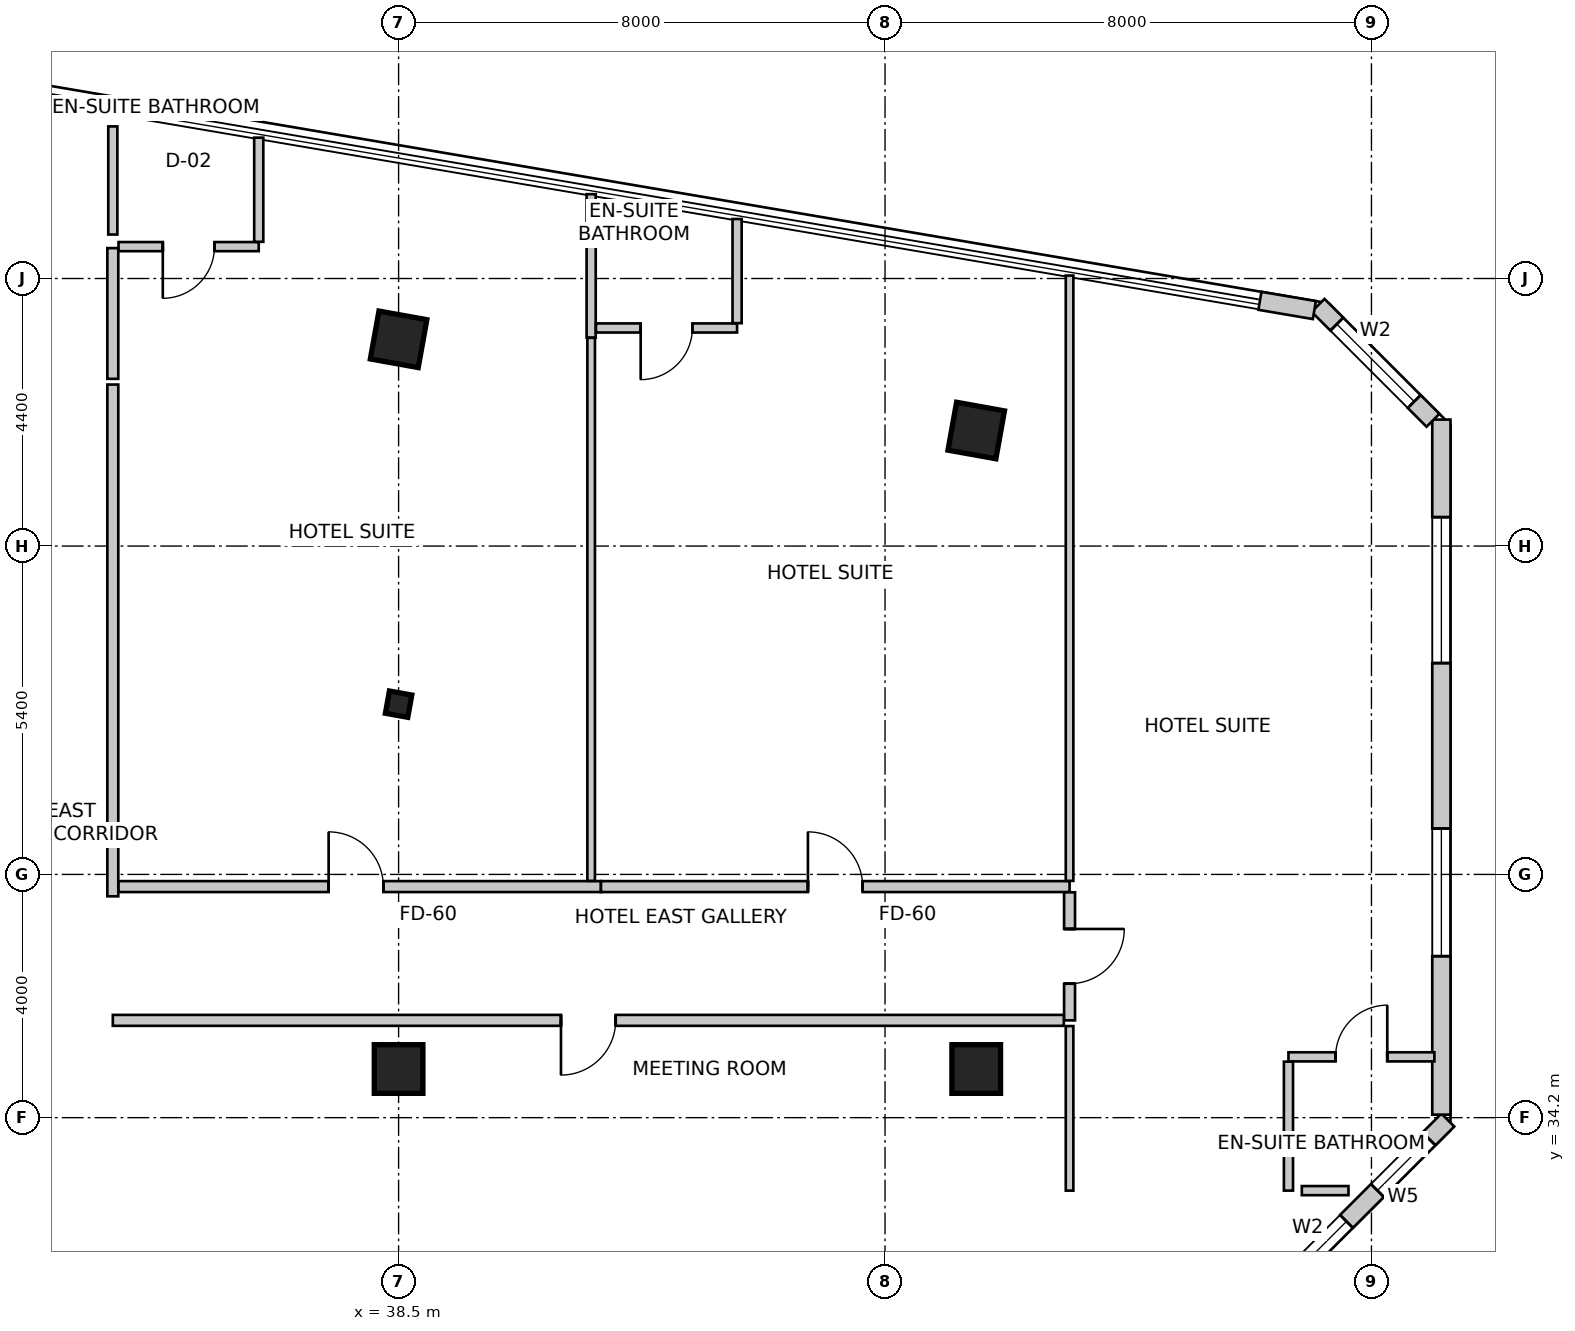
"""IFC4 building model, lengths in metres.
Left out: names, types, materials, properties, quantities, classifications, styles, units other than length and angle.
Written with IfcOpenShell. Run it as: python <this file> out.ifc"""

import sys

from ifc_helpers import new_model, si_unit, direction, frame, frame_2d, origin, origin_2d, place, context, subcontext, project, spatial, rectangle, i_section, extrude, source, transform, mapped, element, fill, save


model = new_model("IFC4")
c1 = context("Model", 3, precision=1e-05, world=origin(), true_north=direction((0.0, 1.0)))
c2 = subcontext(c1, "Body", "Model", "MODEL_VIEW")
j1 = project(units=[si_unit("LENGTHUNIT", "METRE"), si_unit("PLANEANGLEUNIT", "RADIAN")], contexts=[c1])
p1 = place(None, origin())
s1 = spatial("IfcSite", under=j1, at=p1, CompositionType="ELEMENT")
p2 = place(p1, origin())
s2 = spatial("IfcBuilding", under=s1, at=p2, CompositionType="ELEMENT")
p3 = place(p2, frame((0.0, 0.0, 143.0)))
s3 = spatial("IfcBuildingStorey", under=s2, at=p3, CompositionType="ELEMENT", Elevation=143.0)
m1 = source(origin(), c2, "Body", "SweptSolid", [
    extrude(rectangle(XDim=0.8, YDim=0.8, at=origin_2d()), origin(), (0.0, 0.0, 1.0), 3.6),
])
for number, where, z_axis, x_axis in (
    (1, (38.5, 47.0, 0.0), (0.0, 0.0, 1.0), (0.984, -0.177, 0.0)),
    (2, (48.0, 45.5, 0.0), (0.0, 0.0, 1.0), (0.984, -0.177, 0.0)),
    (3, (38.5, 35.0, 0.0), (0.0, 0.0, 1.0), (1.0, 0.0, 0.0)),
    (4, (48.0, 35.0, 0.0), (0.0, 0.0, 1.0), (1.0, 0.0, 0.0)),
):
    element("IfcColumn", number, at=place(p3, frame(where, z_axis=z_axis, x_axis=x_axis)), inside=s3, PredefinedType="COLUMN", context=c2, shape_type="MappedRepresentation", body=[
        mapped(m1, transform((0.0, 0.0, 0.0), scale=1.0)),
    ])
m2 = source(origin(), c2, "Body", "SweptSolid", [
    extrude(i_section(OverallWidth=0.374, OverallDepth=0.372, WebThickness=0.016, FlangeThickness=0.026, FilletRadius=0.015, at=origin_2d()), origin(), (0.0, 0.0, 1.0), 3.6),
])
p4 = place(p3, frame((38.5, 41.0, 0.0), z_axis=(0.0, 0.0, 1.0), x_axis=(0.984195607969, -0.17708474032, 0.0)))
e5 = element("IfcColumn", 5, at=p4, inside=s3, PredefinedType="COLUMN", context=c2, shape_type="MappedRepresentation", body=[
    mapped(m2, transform((0.0, 0.0, 0.0), scale=1.0)),
])
p5 = place(p3, frame((52.476, 30.88, 0.0), z_axis=(0.0, 0.0, 1.0), x_axis=(0.707106781187, 0.707106781187, 0.0)))
e6 = element("IfcWall", 6, at=p5, inside=s3, PredefinedType="SOLIDWALL", context=c2, shape_type="SweptSolid", body=[
    extrude(rectangle(XDim=4.639, YDim=0.3, at=frame_2d((2.319, 0.0))), origin(), (0.0, 0.0, 1.0), 3.35),
])
m3 = source(origin(), c2, "Body", "SweptSolid", [
    extrude(rectangle(XDim=1.8, YDim=2.1, at=frame_2d((0.9, 1.05))), frame((0.0, 0.16, 0.0), z_axis=(0.0, -1.0, 0.0), x_axis=(1.0, 0.0, 0.0)), (0.0, 0.0, 1.0), 0.32),
])
p6 = place(p5, frame((0.482, 0.0, 0.85)))
e7 = element("IfcOpeningElement", 7, at=p6, cuts=e6, PredefinedType="OPENING", context=c2, shape_type="MappedRepresentation", body=[
    mapped(m3, transform((0.0, 0.0, 0.0), scale=1.0)),
])
m4 = source(origin(), c2, "Body", "SweptSolid", [
    extrude(rectangle(XDim=1.2, YDim=1.6, at=frame_2d((0.6, 0.8))), frame((0.0, 0.16, 0.0), z_axis=(0.0, -1.0, 0.0), x_axis=(1.0, 0.0, 0.0)), (0.0, 0.0, 1.0), 0.32),
])
p7 = place(p5, frame((3.001, 0.0, 0.85)))
e8 = element("IfcOpeningElement", 8, at=p7, cuts=e6, PredefinedType="OPENING", context=c2, shape_type="MappedRepresentation", body=[
    mapped(m4, transform((0.0, 0.0, 0.0), scale=1.0)),
])
p8 = place(p3, frame((55.65, 34.249, 0.0), z_axis=(0.0, 0.0, 1.0), x_axis=(0.0, 1.0, 0.0)))
e9 = element("IfcWall", 9, at=p8, inside=s3, PredefinedType="SOLIDWALL", context=c2, shape_type="SweptSolid", body=[
    extrude(rectangle(XDim=11.431, YDim=0.3, at=frame_2d((5.715, 0.0))), origin(), (0.0, 0.0, 1.0), 3.35),
])
m5 = source(origin(), c2, "Body", "SweptSolid", [
    extrude(rectangle(XDim=2.1, YDim=2.0, at=frame_2d((1.05, 1.0))), frame((0.0, 0.16, 0.0), z_axis=(0.0, -1.0, 0.0), x_axis=(1.0, 0.0, 0.0)), (0.0, 0.0, 1.0), 0.32),
])
p9 = place(p8, frame((2.606, 0.0, 0.85)))
e10 = element("IfcOpeningElement", 10, at=p9, cuts=e9, PredefinedType="OPENING", context=c2, shape_type="MappedRepresentation", body=[
    mapped(m5, transform((0.0, 0.0, 0.0), scale=1.0)),
])
m6 = source(origin(), c2, "Body", "SweptSolid", [
    extrude(rectangle(XDim=2.4, YDim=2.2, at=frame_2d((1.2, 1.1))), frame((0.0, 0.16, 0.0), z_axis=(0.0, -1.0, 0.0), x_axis=(1.0, 0.0, 0.0)), (0.0, 0.0, 1.0), 0.32),
])
p10 = place(p8, frame((7.426, 0.0, 0.85)))
e11 = element("IfcOpeningElement", 11, at=p10, cuts=e9, PredefinedType="OPENING", context=c2, shape_type="MappedRepresentation", body=[
    mapped(m6, transform((0.0, 0.0, 0.0), scale=1.0)),
])
p11 = place(p3, frame((55.512, 45.668, 0.0), z_axis=(0.0, 0.0, 1.0), x_axis=(-0.707152443695, 0.707061115729, 0.0)))
e12 = element("IfcWall", 12, at=p11, inside=s3, PredefinedType="SOLIDWALL", context=c2, shape_type="SweptSolid", body=[
    extrude(rectangle(XDim=2.673, YDim=0.3, at=frame_2d((1.337, 0.0))), origin(), (0.0, 0.0, 1.0), 3.35),
])
p12 = place(p11, frame((0.437, 0.0, 0.85)))
e13 = element("IfcOpeningElement", 13, at=p12, cuts=e12, PredefinedType="OPENING", context=c2, shape_type="MappedRepresentation", body=[
    mapped(m3, transform((0.0, 0.0, 0.0), scale=1.0)),
])
p13 = place(p3, frame((53.561, 47.48, 0.0), z_axis=(0.0, 0.0, 1.0), x_axis=(-0.985836300899, 0.167710428506, 0.0)))
e14 = element("IfcWall", 14, at=p13, inside=s3, PredefinedType="SOLIDWALL", context=c2, shape_type="SweptSolid", body=[
    extrude(rectangle(XDim=0.908, YDim=0.3, at=frame_2d((0.454, 0.0))), origin(), (0.0, 0.0, 1.0), 3.35),
])
p14 = place(p3, frame((33.8, 48.5, 0.0), z_axis=(0.0, 0.0, 1.0), x_axis=(0.0, -1.0, 0.0)))
e15 = element("IfcWall", 15, at=p14, inside=s3, PredefinedType="PARTITIONING", context=c2, shape_type="SweptSolid", body=[
    extrude(rectangle(XDim=2.15, YDim=0.18, at=frame_2d((1.075, 0.0))), origin(), (0.0, 0.0, 1.0), 2.492),
])
p15 = place(p3, frame((33.8, 46.256, 0.0), z_axis=(0.0, 0.0, 1.0), x_axis=(0.0, -1.0, 0.0)))
e16 = element("IfcWall", 16, at=p15, inside=s3, PredefinedType="PARTITIONING", context=c2, shape_type="SweptSolid", body=[
    extrude(rectangle(XDim=8.416, YDim=0.18, at=frame_2d((4.208, 0.0))), origin(), (0.0, 0.0, 1.0), 2.922),
])
p16 = place(p3, frame((33.894, 38.0, 0.0), z_axis=(0.0, 0.0, 1.0), x_axis=(1.0, 0.0, 0.0)))
e17 = element("IfcWall", 17, at=p16, inside=s3, PredefinedType="PARTITIONING", context=c2, shape_type="SweptSolid", body=[
    extrude(rectangle(XDim=7.933, YDim=0.18, at=frame_2d((3.966, 0.0))), origin(), (0.0, 0.0, 1.0), 2.803),
])
m7 = source(origin(), c2, "Body", "SweptSolid", [
    extrude(rectangle(XDim=0.9, YDim=2.15, at=frame_2d((0.45, 1.075))), frame((0.0, 0.1, 0.0), z_axis=(0.0, -1.0, 0.0), x_axis=(1.0, 0.0, 0.0)), (0.0, 0.0, 1.0), 0.2),
])
p17 = place(p16, frame((3.455, 0.0, 0.0)))
e18 = element("IfcOpeningElement", 18, at=p17, cuts=e17, PredefinedType="OPENING", context=c2, shape_type="MappedRepresentation", body=[
    mapped(m7, transform((0.0, 0.0, 0.0), scale=1.0)),
])
p18 = place(p3, frame((41.829, 38.0, 0.0), z_axis=(0.0, 0.0, 1.0), x_axis=(1.0, 0.0, 0.0)))
e19 = element("IfcWall", 19, at=p18, inside=s3, PredefinedType="PARTITIONING", context=c2, shape_type="SweptSolid", body=[
    extrude(rectangle(XDim=7.706, YDim=0.18, at=frame_2d((3.853, 0.0))), origin(), (0.0, 0.0, 1.0), 2.803),
])
p19 = place(p18, frame((3.403, 0.0, 0.0)))
e20 = element("IfcOpeningElement", 20, at=p19, cuts=e19, PredefinedType="OPENING", context=c2, shape_type="MappedRepresentation", body=[
    mapped(m7, transform((0.0, 0.0, 0.0), scale=1.0)),
])
p20 = place(p3, frame((49.535, 37.906, 0.0), z_axis=(0.0, 0.0, 1.0), x_axis=(0.0, -1.0, 0.0)))
e21 = element("IfcWall", 21, at=p20, inside=s3, PredefinedType="PARTITIONING", context=c2, shape_type="SweptSolid", body=[
    extrude(rectangle(XDim=2.106, YDim=0.18, at=frame_2d((1.053, 0.0))), origin(), (0.0, 0.0, 1.0), 3.35),
])
p21 = place(p20, frame((0.603, 0.0, 0.0)))
e22 = element("IfcOpeningElement", 22, at=p21, cuts=e21, PredefinedType="OPENING", context=c2, shape_type="MappedRepresentation", body=[
    mapped(m7, transform((0.0, 0.0, 0.0), scale=1.0)),
])
p22 = place(p3, frame((49.441, 35.8, 0.0), z_axis=(0.0, 0.0, 1.0), x_axis=(-1.0, 0.0, 0.0)))
e23 = element("IfcWall", 23, at=p22, inside=s3, PredefinedType="PARTITIONING", context=c2, shape_type="SweptSolid", body=[
    extrude(rectangle(XDim=15.641, YDim=0.18, at=frame_2d((7.82, 0.0))), origin(), (0.0, 0.0, 1.0), 2.803),
])
p23 = place(p22, frame((7.371, 0.0, 0.0)))
e24 = element("IfcOpeningElement", 24, at=p23, cuts=e23, PredefinedType="OPENING", context=c2, shape_type="MappedRepresentation", body=[
    mapped(m7, transform((0.0, 0.0, 0.0), scale=1.0)),
])
p24 = place(p3, frame((36.2, 48.524, 0.0), z_axis=(0.0, 0.0, 1.0), x_axis=(-1.0, 0.0, 0.0)))
e25 = element("IfcWall", 25, at=p24, inside=s3, PredefinedType="PARTITIONING", context=c2, shape_type="SweptSolid", body=[
    extrude(rectangle(XDim=2.306, YDim=0.15, at=frame_2d((1.153, 0.0))), origin(), (0.0, 0.0, 1.0), 3.35),
])
m8 = source(origin(), c2, "Body", "SweptSolid", [
    extrude(rectangle(XDim=0.85, YDim=2.15, at=frame_2d((0.425, 1.075))), frame((0.0, 0.085, 0.0), z_axis=(0.0, -1.0, 0.0), x_axis=(1.0, 0.0, 0.0)), (0.0, 0.0, 1.0), 0.17),
])
p25 = place(p24, frame((0.728, 0.0, 0.0)))
e26 = element("IfcOpeningElement", 26, at=p25, cuts=e25, PredefinedType="OPENING", context=c2, shape_type="MappedRepresentation", body=[
    mapped(m8, transform((0.0, 0.0, 0.0), scale=1.0)),
])
p26 = place(p3, frame((36.2, 50.316, 0.0), z_axis=(0.0, 0.0, 1.0), x_axis=(0.0, -1.0, 0.0)))
e27 = element("IfcWall", 27, at=p26, inside=s3, PredefinedType="PARTITIONING", context=c2, shape_type="SweptSolid", body=[
    extrude(rectangle(XDim=1.713, YDim=0.15, at=frame_2d((0.856, 0.0))), origin(), (0.0, 0.0, 1.0), 3.35),
])
p27 = place(p3, frame((41.667, 49.387, 0.0), z_axis=(0.0, 0.0, 1.0), x_axis=(0.0, -1.0, 0.0)))
e28 = element("IfcWall", 28, at=p27, inside=s3, PredefinedType="PARTITIONING", context=c2, shape_type="SweptSolid", body=[
    extrude(rectangle(XDim=2.36, YDim=0.15, at=frame_2d((1.18, 0.0))), origin(), (0.0, 0.0, 1.0), 3.35),
])
p28 = place(p3, frame((41.667, 47.025, 0.0), z_axis=(0.0, 0.0, 1.0), x_axis=(0.0, -1.0, 0.0)))
e29 = element("IfcWall", 29, at=p28, inside=s3, PredefinedType="PARTITIONING", context=c2, shape_type="SweptSolid", body=[
    extrude(rectangle(XDim=8.931, YDim=0.125, at=frame_2d((4.465, 0.0))), origin(), (0.0, 0.0, 1.0), 2.492),
])
p29 = place(p3, frame((44.067, 47.187, 0.0), z_axis=(0.0, 0.0, 1.0), x_axis=(-1.0, 0.0, 0.0)))
e30 = element("IfcWall", 30, at=p29, inside=s3, PredefinedType="PARTITIONING", context=c2, shape_type="SweptSolid", body=[
    extrude(rectangle(XDim=2.321, YDim=0.15, at=frame_2d((1.16, 0.0))), origin(), (0.0, 0.0, 1.0), 3.35),
])
p30 = place(p29, frame((0.736, 0.0, 0.0)))
e31 = element("IfcOpeningElement", 31, at=p30, cuts=e30, PredefinedType="OPENING", context=c2, shape_type="MappedRepresentation", body=[
    mapped(m8, transform((0.0, 0.0, 0.0), scale=1.0)),
])
p31 = place(p3, frame((44.067, 48.979, 0.0), z_axis=(0.0, 0.0, 1.0), x_axis=(0.0, -1.0, 0.0)))
e32 = element("IfcWall", 32, at=p31, inside=s3, PredefinedType="PARTITIONING", context=c2, shape_type="SweptSolid", body=[
    extrude(rectangle(XDim=1.713, YDim=0.15, at=frame_2d((0.856, 0.0))), origin(), (0.0, 0.0, 1.0), 3.35),
])
p32 = place(p3, frame((49.535, 48.049, 0.0), z_axis=(0.0, 0.0, 1.0), x_axis=(0.0, -1.0, 0.0)))
e33 = element("IfcWall", 33, at=p32, inside=s3, PredefinedType="PARTITIONING", context=c2, shape_type="SweptSolid", body=[
    extrude(rectangle(XDim=9.955, YDim=0.125, at=frame_2d((4.977, 0.0))), origin(), (0.0, 0.0, 1.0), 3.35),
])
p33 = place(p3, frame((53.135, 35.2, 0.0), z_axis=(0.0, 0.0, 1.0), x_axis=(1.0, 0.0, 0.0)))
e34 = element("IfcWall", 34, at=p33, inside=s3, PredefinedType="PARTITIONING", context=c2, shape_type="SweptSolid", body=[
    extrude(rectangle(XDim=2.4, YDim=0.15, at=frame_2d((1.2, 0.0))), origin(), (0.0, 0.0, 1.0), 3.35),
])
p34 = place(p33, frame((0.775, 0.0, 0.0)))
e35 = element("IfcOpeningElement", 35, at=p34, cuts=e34, PredefinedType="OPENING", context=c2, shape_type="MappedRepresentation", body=[
    mapped(m8, transform((0.0, 0.0, 0.0), scale=1.0)),
])
p35 = place(p3, frame((53.135, 33.0, 0.0), z_axis=(0.0, 0.0, 1.0), x_axis=(0.0, 1.0, 0.0)))
e36 = element("IfcWall", 36, at=p35, inside=s3, PredefinedType="PARTITIONING", context=c2, shape_type="SweptSolid", body=[
    extrude(rectangle(XDim=2.121, YDim=0.15, at=frame_2d((1.061, 0.0))), origin(), (0.0, 0.0, 1.0), 3.35),
])
p36 = place(p3, frame((49.535, 33.0, 0.0), z_axis=(0.0, 0.0, 1.0), x_axis=(0.0, 1.0, 0.0)))
e37 = element("IfcWall", 37, at=p36, inside=s3, PredefinedType="PARTITIONING", context=c2, shape_type="SweptSolid", body=[
    extrude(rectangle(XDim=2.706, YDim=0.125, at=frame_2d((1.353, 0.0))), origin(), (0.0, 0.0, 1.0), 3.35),
])
p37 = place(p3, frame((33.8, 48.723, 0.0), z_axis=(0.0, 0.0, 1.0), x_axis=(0.0, 1.0, 0.0)))
e38 = element("IfcWall", 38, at=p37, inside=s3, PredefinedType="PARTITIONING", context=c2, shape_type="SweptSolid", body=[
    extrude(rectangle(XDim=1.778, YDim=0.15, at=frame_2d((0.889, 0.0))), origin(), (0.0, 0.0, 1.0), 3.35),
])
p38 = place(p3, frame((54.122, 33.0, 0.0), z_axis=(0.0, 0.0, 1.0), x_axis=(-1.0, 0.0, 0.0)))
e39 = element("IfcWall", 39, at=p38, inside=s3, PredefinedType="PARTITIONING", context=c2, shape_type="SweptSolid", body=[
    extrude(rectangle(XDim=0.767, YDim=0.15, at=frame_2d((0.384, 0.0))), origin(), (0.0, 0.0, 1.0), 3.35),
])
m9 = source(origin(), c2, "Body", "SweptSolid", [
    extrude(rectangle(XDim=1.8, YDim=2.1, at=frame_2d((0.9, 1.05))), frame((0.0, -0.015, 0.0), z_axis=(0.0, -1.0, 0.0), x_axis=(1.0, 0.0, 0.0)), (0.0, 0.0, 1.0), 0.06),
])
p39 = place(p6, origin())
e40 = element("IfcWindow", 40, at=p39, inside=s3, PartitioningType="SINGLE_PANEL", PredefinedType="WINDOW", context=c2, shape_type="MappedRepresentation", body=[
    mapped(m9, transform((0.0, 0.0, 0.0), scale=1.0)),
])
fill(e7, e40)
m10 = source(origin(), c2, "Body", "SweptSolid", [
    extrude(rectangle(XDim=1.2, YDim=1.6, at=frame_2d((0.6, 0.8))), frame((0.0, -0.015, 0.0), z_axis=(0.0, -1.0, 0.0), x_axis=(1.0, 0.0, 0.0)), (0.0, 0.0, 1.0), 0.06),
])
p40 = place(p7, origin())
e41 = element("IfcWindow", 41, at=p40, inside=s3, PartitioningType="SINGLE_PANEL", PredefinedType="WINDOW", context=c2, shape_type="MappedRepresentation", body=[
    mapped(m10, transform((0.0, 0.0, 0.0), scale=1.0)),
])
fill(e8, e41)
m11 = source(origin(), c2, "Body", "SweptSolid", [
    extrude(rectangle(XDim=2.1, YDim=2.0, at=frame_2d((1.05, 1.0))), frame((0.0, -0.015, 0.0), z_axis=(0.0, -1.0, 0.0), x_axis=(1.0, 0.0, 0.0)), (0.0, 0.0, 1.0), 0.06),
])
p41 = place(p9, origin())
e42 = element("IfcWindow", 42, at=p41, inside=s3, PartitioningType="SINGLE_PANEL", PredefinedType="WINDOW", context=c2, shape_type="MappedRepresentation", body=[
    mapped(m11, transform((0.0, 0.0, 0.0), scale=1.0)),
])
fill(e10, e42)
m12 = source(origin(), c2, "Body", "SweptSolid", [
    extrude(rectangle(XDim=2.4, YDim=2.2, at=frame_2d((1.2, 1.1))), frame((0.0, -0.015, 0.0), z_axis=(0.0, -1.0, 0.0), x_axis=(1.0, 0.0, 0.0)), (0.0, 0.0, 1.0), 0.06),
])
p42 = place(p10, origin())
e43 = element("IfcWindow", 43, at=p42, inside=s3, PartitioningType="SINGLE_PANEL", PredefinedType="WINDOW", context=c2, shape_type="MappedRepresentation", body=[
    mapped(m12, transform((0.0, 0.0, 0.0), scale=1.0)),
])
fill(e11, e43)
p43 = place(p12, origin())
e44 = element("IfcWindow", 44, at=p43, inside=s3, PartitioningType="SINGLE_PANEL", PredefinedType="WINDOW", context=c2, shape_type="MappedRepresentation", body=[
    mapped(m9, transform((0.0, 0.0, 0.0), scale=1.0)),
])
fill(e13, e44)
m13 = source(origin(), c2, "Body", "SweptSolid", [
    extrude(rectangle(XDim=0.85, YDim=2.15, at=frame_2d((0.425, 1.075))), frame((0.0, 0.025, 0.0), z_axis=(0.0, -1.0, 0.0), x_axis=(1.0, 0.0, 0.0)), (0.0, 0.0, 1.0), 0.05),
])
p44 = place(p25, origin())
e45 = element("IfcDoor", 45, at=p44, inside=s3, OperationType="SINGLE_SWING_RIGHT", PredefinedType="DOOR", context=c2, shape_type="MappedRepresentation", body=[
    mapped(m13, transform((0.0, 0.0, 0.0), scale=1.0)),
])
fill(e26, e45)
m14 = source(origin(), c2, "Body", "SweptSolid", [
    extrude(rectangle(XDim=0.9, YDim=2.15, at=frame_2d((0.45, 1.075))), frame((0.0, 0.025, 0.0), z_axis=(0.0, -1.0, 0.0), x_axis=(1.0, 0.0, 0.0)), (0.0, 0.0, 1.0), 0.05),
])
p45 = place(p17, origin())
e46 = element("IfcDoor", 46, at=p45, inside=s3, OperationType="SINGLE_SWING_LEFT", PredefinedType="DOOR", context=c2, shape_type="MappedRepresentation", body=[
    mapped(m14, transform((0.0, 0.0, 0.0), scale=1.0)),
])
fill(e18, e46)
p46 = place(p30, origin())
e47 = element("IfcDoor", 47, at=p46, inside=s3, OperationType="SINGLE_SWING_RIGHT", PredefinedType="DOOR", context=c2, shape_type="MappedRepresentation", body=[
    mapped(m13, transform((0.0, 0.0, 0.0), scale=1.0)),
])
fill(e31, e47)
p47 = place(p19, origin())
e48 = element("IfcDoor", 48, at=p47, inside=s3, OperationType="SINGLE_SWING_LEFT", PredefinedType="DOOR", context=c2, shape_type="MappedRepresentation", body=[
    mapped(m14, transform((0.0, 0.0, 0.0), scale=1.0)),
])
fill(e20, e48)
p48 = place(p34, origin())
e49 = element("IfcDoor", 49, at=p48, inside=s3, OperationType="SINGLE_SWING_RIGHT", PredefinedType="DOOR", context=c2, shape_type="MappedRepresentation", body=[
    mapped(m13, transform((0.0, 0.0, 0.0), scale=1.0)),
])
fill(e35, e49)
p49 = place(p21, origin())
e50 = element("IfcDoor", 50, at=p49, inside=s3, OperationType="SINGLE_SWING_LEFT", PredefinedType="DOOR", context=c2, shape_type="MappedRepresentation", body=[
    mapped(m14, transform((0.0, 0.0, 0.0), scale=1.0)),
])
fill(e22, e50)
m15 = source(origin(), c2, "Body", "SweptSolid", [
    extrude(rectangle(XDim=0.9, YDim=2.15, at=frame_2d((0.45, 1.075))), frame((0.0, 0.025, 0.0), z_axis=(0.0, -1.0, 0.0), x_axis=(1.0, 0.0, 0.0)), (0.0, 0.0, 1.0), 0.05),
])
p50 = place(p23, origin())
e51 = element("IfcDoor", 51, at=p50, inside=s3, OperationType="SINGLE_SWING_RIGHT", PredefinedType="DOOR", context=c2, shape_type="MappedRepresentation", body=[
    mapped(m15, transform((0.0, 0.0, 0.0), scale=1.0)),
])
fill(e24, e51)
save(model, sys.argv[1])
